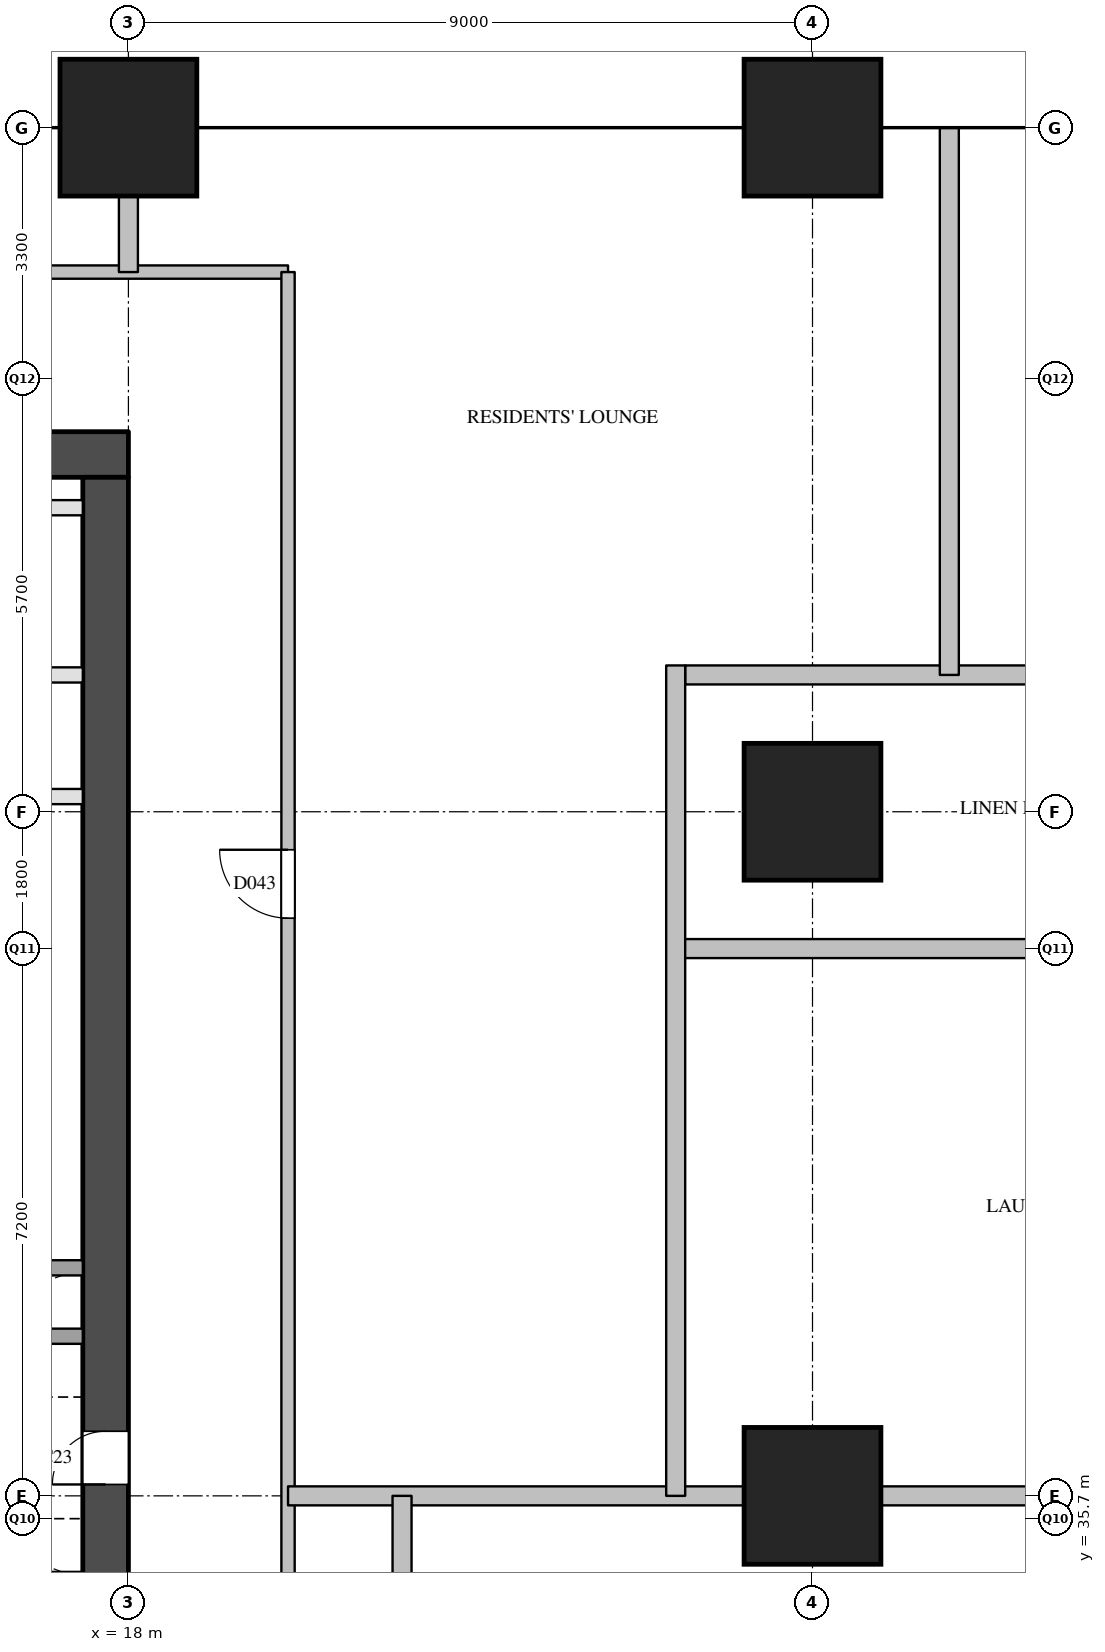
"""IFC4 building model, lengths in metres.
Left out: names, types, materials, properties, quantities, classifications, styles, units other than length and angle.
Written with IfcOpenShell. Run it as: python <this file> out.ifc"""

import sys

from ifc_helpers import new_model, si_unit, direction, frame, frame_2d, origin, origin_2d, place, context, subcontext, project, spatial, rectangle, extrude, element, fill, save


model = new_model("IFC4")
c1 = context("Model", 3, precision=1e-05, world=origin(), true_north=direction((0.0, 1.0)))
c2 = subcontext(c1, "Body", "Model", "MODEL_VIEW")
j1 = project(units=[si_unit("LENGTHUNIT", "METRE"), si_unit("PLANEANGLEUNIT", "RADIAN")], contexts=[c1])
p1 = place(None, origin())
s1 = spatial("IfcSite", under=j1, at=p1, CompositionType="ELEMENT")
p2 = place(p1, origin())
s2 = spatial("IfcBuilding", under=s1, at=p2, CompositionType="ELEMENT")
p3 = place(p2, frame((0.0, 0.0, 69.0)))
s3 = spatial("IfcBuildingStorey", under=s2, at=p3, CompositionType="ELEMENT", Elevation=69.0)
for number, where, z_axis, x_axis in (
    (1, (18.0, 54.0, 0.0), (0.0, 0.0, 1.0), (1.0, 0.0, 0.0)),
    (2, (27.0, 36.0, 0.0), (0.0, 0.0, 1.0), (1.0, 0.0, 0.0)),
    (3, (27.0, 45.0, 0.0), (0.0, 0.0, 1.0), (1.0, 0.0, 0.0)),
    (4, (27.0, 54.0, 0.0), (0.0, 0.0, 1.0), (1.0, 0.0, 0.0)),
):
    element("IfcColumn", number, at=place(p3, frame(where, z_axis=z_axis, x_axis=x_axis)), inside=s3, PredefinedType="COLUMN", context=c2, shape_type="SweptSolid", body=[
        extrude(rectangle(XDim=1.8, YDim=1.8, at=origin_2d()), origin(), (0.0, 0.0, 1.0), 3.8),
    ])
p4 = place(p3, frame((5.6, 49.7, 0.0), z_axis=(0.0, 0.0, 1.0), x_axis=(1.0, 0.0, 0.0)))
e5 = element("IfcWall", 5, at=p4, inside=s3, PredefinedType="SHEAR", context=c2, shape_type="SweptSolid", body=[
    extrude(rectangle(XDim=12.4, YDim=0.6, at=frame_2d((6.2, 0.0))), origin(), (0.0, 0.0, 1.0), 3.5),
])
p5 = place(p3, frame((17.7, 29.1, 0.0), z_axis=(0.0, 0.0, 1.0), x_axis=(0.0, 1.0, 0.0)))
e6 = element("IfcWall", 6, at=p5, inside=s3, PredefinedType="SHEAR", context=c2, shape_type="SweptSolid", body=[
    extrude(rectangle(XDim=20.3, YDim=0.6, at=frame_2d((10.15, 0.0))), origin(), (0.0, 0.0, 1.0), 3.5),
])
p6 = place(p5, frame((1.25, 0.0, 0.0)))
e7 = element("IfcOpeningElement", 7, at=p6, cuts=e6, PredefinedType="OPENING", context=c2, shape_type="SweptSolid", body=[
    extrude(rectangle(XDim=0.7, YDim=2.1, at=frame_2d((0.35, 1.05))), frame((0.0, 0.31, 0.0), z_axis=(0.0, -1.0, 0.0), x_axis=(1.0, 0.0, 0.0)), (0.0, 0.0, 1.0), 0.62),
])
p7 = place(p5, frame((7.05, 0.0, 0.0)))
e8 = element("IfcOpeningElement", 8, at=p7, cuts=e6, PredefinedType="OPENING", context=c2, shape_type="SweptSolid", body=[
    extrude(rectangle(XDim=0.7, YDim=2.1, at=frame_2d((0.35, 1.05))), frame((0.0, 0.31, 0.0), z_axis=(0.0, -1.0, 0.0), x_axis=(1.0, 0.0, 0.0)), (0.0, 0.0, 1.0), 0.62),
])
p8 = place(p3, frame((6.2, 38.1, 0.0), z_axis=(0.0, 0.0, 1.0), x_axis=(1.0, 0.0, 0.0)))
e9 = element("IfcWall", 9, at=p8, inside=s3, PredefinedType="SOLIDWALL", context=c2, shape_type="SweptSolid", body=[
    extrude(rectangle(XDim=11.2, YDim=0.2, at=frame_2d((5.6, 0.0))), origin(), (0.0, 0.0, 1.0), 3.5),
])
p9 = place(p8, frame((0.45, 0.0, 0.0)))
e10 = element("IfcOpeningElement", 10, at=p9, cuts=e9, PredefinedType="OPENING", context=c2, shape_type="SweptSolid", body=[
    extrude(rectangle(XDim=1.2, YDim=2.1, at=frame_2d((0.6, 1.05))), frame((0.0, 0.11, 0.0), z_axis=(0.0, -1.0, 0.0), x_axis=(1.0, 0.0, 0.0)), (0.0, 0.0, 1.0), 0.22),
])
p10 = place(p8, frame((2.55, 0.0, 0.0)))
e11 = element("IfcOpeningElement", 11, at=p10, cuts=e9, PredefinedType="OPENING", context=c2, shape_type="SweptSolid", body=[
    extrude(rectangle(XDim=1.2, YDim=2.1, at=frame_2d((0.6, 1.05))), frame((0.0, 0.11, 0.0), z_axis=(0.0, -1.0, 0.0), x_axis=(1.0, 0.0, 0.0)), (0.0, 0.0, 1.0), 0.22),
])
p11 = place(p8, frame((4.65, 0.0, 0.0)))
e12 = element("IfcOpeningElement", 12, at=p11, cuts=e9, PredefinedType="OPENING", context=c2, shape_type="SweptSolid", body=[
    extrude(rectangle(XDim=1.2, YDim=2.1, at=frame_2d((0.6, 1.05))), frame((0.0, 0.11, 0.0), z_axis=(0.0, -1.0, 0.0), x_axis=(1.0, 0.0, 0.0)), (0.0, 0.0, 1.0), 0.22),
])
p12 = place(p8, frame((6.75, 0.0, 0.0)))
e13 = element("IfcOpeningElement", 13, at=p12, cuts=e9, PredefinedType="OPENING", context=c2, shape_type="SweptSolid", body=[
    extrude(rectangle(XDim=1.2, YDim=2.1, at=frame_2d((0.6, 1.05))), frame((0.0, 0.11, 0.0), z_axis=(0.0, -1.0, 0.0), x_axis=(1.0, 0.0, 0.0)), (0.0, 0.0, 1.0), 0.22),
])
p13 = place(p3, frame((12.5, 39.0, 0.0), z_axis=(0.0, 0.0, 1.0), x_axis=(1.0, 0.0, 0.0)))
e14 = element("IfcWall", 14, at=p13, inside=s3, PredefinedType="SOLIDWALL", context=c2, shape_type="SweptSolid", body=[
    extrude(rectangle(XDim=4.9, YDim=0.2, at=frame_2d((2.45, 0.0))), origin(), (0.0, 0.0, 1.0), 3.5),
])
p14 = place(p3, frame((12.5, 45.2, 0.0), z_axis=(0.0, 0.0, 1.0), x_axis=(1.0, 0.0, 0.0)))
e15 = element("IfcWall", 15, at=p14, inside=s3, PredefinedType="PARTITIONING", context=c2, shape_type="SweptSolid", body=[
    extrude(rectangle(XDim=4.9, YDim=0.2, at=frame_2d((2.45, 0.0))), origin(), (0.0, 0.0, 1.0), 3.5),
])
p15 = place(p14, frame((0.53, 0.0, 0.0)))
e16 = element("IfcOpeningElement", 16, at=p15, cuts=e15, PredefinedType="OPENING", context=c2, shape_type="SweptSolid", body=[
    extrude(rectangle(XDim=0.9, YDim=2.1, at=frame_2d((0.45, 1.05))), frame((0.0, 0.11, 0.0), z_axis=(0.0, -1.0, 0.0), x_axis=(1.0, 0.0, 0.0)), (0.0, 0.0, 1.0), 0.22),
])
p16 = place(p14, frame((2.98, 0.0, 0.0)))
e17 = element("IfcOpeningElement", 17, at=p16, cuts=e15, PredefinedType="OPENING", context=c2, shape_type="SweptSolid", body=[
    extrude(rectangle(XDim=0.9, YDim=2.1, at=frame_2d((0.45, 1.05))), frame((0.0, 0.11, 0.0), z_axis=(0.0, -1.0, 0.0), x_axis=(1.0, 0.0, 0.0)), (0.0, 0.0, 1.0), 0.22),
])
p17 = place(p3, frame((6.2, 46.8, 0.0), z_axis=(0.0, 0.0, 1.0), x_axis=(1.0, 0.0, 0.0)))
e18 = element("IfcWall", 18, at=p17, inside=s3, PredefinedType="PARTITIONING", context=c2, shape_type="SweptSolid", body=[
    extrude(rectangle(XDim=11.2, YDim=0.2, at=frame_2d((5.6, 0.0))), origin(), (0.0, 0.0, 1.0), 3.5),
])
p18 = place(p17, frame((1.23, 0.0, 0.0)))
e19 = element("IfcOpeningElement", 19, at=p18, cuts=e18, PredefinedType="OPENING", context=c2, shape_type="SweptSolid", body=[
    extrude(rectangle(XDim=0.9, YDim=2.1, at=frame_2d((0.45, 1.05))), frame((0.0, 0.11, 0.0), z_axis=(0.0, -1.0, 0.0), x_axis=(1.0, 0.0, 0.0)), (0.0, 0.0, 1.0), 0.22),
])
p19 = place(p17, frame((6.83, 0.0, 0.0)))
e20 = element("IfcOpeningElement", 20, at=p19, cuts=e18, PredefinedType="OPENING", context=c2, shape_type="SweptSolid", body=[
    extrude(rectangle(XDim=0.9, YDim=2.1, at=frame_2d((0.45, 1.05))), frame((0.0, 0.11, 0.0), z_axis=(0.0, -1.0, 0.0), x_axis=(1.0, 0.0, 0.0)), (0.0, 0.0, 1.0), 0.22),
])
p20 = place(p3, frame((6.2, 49.0, 0.0), z_axis=(0.0, 0.0, 1.0), x_axis=(1.0, 0.0, 0.0)))
e21 = element("IfcWall", 21, at=p20, inside=s3, PredefinedType="PARTITIONING", context=c2, shape_type="SweptSolid", body=[
    extrude(rectangle(XDim=11.2, YDim=0.2, at=frame_2d((5.6, 0.0))), origin(), (0.0, 0.0, 1.0), 3.5),
])
p21 = place(p3, frame((3.5, 52.1, 0.0), z_axis=(0.0, 0.0, 1.0), x_axis=(1.0, 0.0, 0.0)))
e22 = element("IfcWall", 22, at=p21, inside=s3, PredefinedType="PARTITIONING", context=c2, shape_type="SweptSolid", body=[
    extrude(rectangle(XDim=16.6, YDim=0.175, at=frame_2d((8.3, 0.0))), origin(), (0.0, 0.0, 1.0), 3.5),
])
p22 = place(p21, frame((7.389, 0.0, 0.0)))
e23 = element("IfcOpeningElement", 23, at=p22, cuts=e22, PredefinedType="OPENING", context=c2, shape_type="SweptSolid", body=[
    extrude(rectangle(XDim=0.9, YDim=2.1, at=frame_2d((0.45, 1.05))), frame((0.0, 0.097, 0.0), z_axis=(0.0, -1.0, 0.0), x_axis=(1.0, 0.0, 0.0)), (0.0, 0.0, 1.0), 0.195),
])
p23 = place(p3, frame((20.1, 28.52, 0.0), z_axis=(0.0, 0.0, 1.0), x_axis=(0.0, 1.0, 0.0)))
e24 = element("IfcWall", 24, at=p23, inside=s3, PredefinedType="PARTITIONING", context=c2, shape_type="SweptSolid", body=[
    extrude(rectangle(XDim=23.58, YDim=0.175, at=frame_2d((11.79, 0.0))), origin(), (0.0, 0.0, 1.0), 3.5),
])
p24 = place(p23, frame((3.43, 0.0, 0.0)))
e25 = element("IfcOpeningElement", 25, at=p24, cuts=e24, PredefinedType="OPENING", context=c2, shape_type="SweptSolid", body=[
    extrude(rectangle(XDim=0.9, YDim=2.1, at=frame_2d((0.45, 1.05))), frame((0.0, 0.097, 0.0), z_axis=(0.0, -1.0, 0.0), x_axis=(1.0, 0.0, 0.0)), (0.0, 0.0, 1.0), 0.195),
])
p25 = place(p23, frame((15.08, 0.0, 0.0)))
e26 = element("IfcOpeningElement", 26, at=p25, cuts=e24, PredefinedType="OPENING", context=c2, shape_type="SweptSolid", body=[
    extrude(rectangle(XDim=0.9, YDim=2.1, at=frame_2d((0.45, 1.05))), frame((0.0, 0.097, 0.0), z_axis=(0.0, -1.0, 0.0), x_axis=(1.0, 0.0, 0.0)), (0.0, 0.0, 1.0), 0.195),
])
p26 = place(p3, frame((20.1, 36.0, 0.0), z_axis=(0.0, 0.0, 1.0), x_axis=(1.0, 0.0, 0.0)))
e27 = element("IfcWall", 27, at=p26, inside=s3, PredefinedType="PARTITIONING", context=c2, shape_type="SweptSolid", body=[
    extrude(rectangle(XDim=13.8, YDim=0.25, at=frame_2d((6.9, 0.0))), origin(), (0.0, 0.0, 1.0), 3.5),
])
p27 = place(p3, frame((25.2, 43.2, 0.0), z_axis=(0.0, 0.0, 1.0), x_axis=(1.0, 0.0, 0.0)))
e28 = element("IfcWall", 28, at=p27, inside=s3, PredefinedType="PARTITIONING", context=c2, shape_type="SweptSolid", body=[
    extrude(rectangle(XDim=8.7, YDim=0.25, at=frame_2d((4.35, 0.0))), origin(), (0.0, 0.0, 1.0), 2.5),
])
p28 = place(p3, frame((25.325, 46.8, 0.0), z_axis=(0.0, 0.0, 1.0), x_axis=(1.0, 0.0, 0.0)))
e29 = element("IfcWall", 29, at=p28, inside=s3, PredefinedType="PARTITIONING", context=c2, shape_type="SweptSolid", body=[
    extrude(rectangle(XDim=8.575, YDim=0.25, at=frame_2d((4.288, 0.0))), origin(), (0.0, 0.0, 1.0), 2.5),
])
p29 = place(p3, frame((18.0, 52.1, 0.0), z_axis=(0.0, 0.0, 1.0), x_axis=(0.0, 1.0, 0.0)))
e30 = element("IfcWall", 30, at=p29, inside=s3, PredefinedType="PARTITIONING", context=c2, shape_type="SweptSolid", body=[
    extrude(rectangle(XDim=1.9, YDim=0.25, at=frame_2d((0.95, 0.0))), origin(), (0.0, 0.0, 1.0), 3.5),
])
p30 = place(p3, frame((21.6, 28.8, 0.0), z_axis=(0.0, 0.0, 1.0), x_axis=(0.0, 1.0, 0.0)))
e31 = element("IfcWall", 31, at=p30, inside=s3, PredefinedType="PARTITIONING", context=c2, shape_type="SweptSolid", body=[
    extrude(rectangle(XDim=7.2, YDim=0.25, at=frame_2d((3.6, 0.0))), origin(), (0.0, 0.0, 1.0), 3.5),
])
p31 = place(p3, frame((25.2, 36.0, 0.0), z_axis=(0.0, 0.0, 1.0), x_axis=(0.0, 1.0, 0.0)))
e32 = element("IfcWall", 32, at=p31, inside=s3, PredefinedType="PARTITIONING", context=c2, shape_type="SweptSolid", body=[
    extrude(rectangle(XDim=10.925, YDim=0.25, at=frame_2d((5.462, 0.0))), origin(), (0.0, 0.0, 1.0), 3.5),
])
p32 = place(p3, frame((28.8, 46.8, 0.0), z_axis=(0.0, 0.0, 1.0), x_axis=(0.0, 1.0, 0.0)))
e33 = element("IfcWall", 33, at=p32, inside=s3, PredefinedType="PARTITIONING", context=c2, shape_type="SweptSolid", body=[
    extrude(rectangle(XDim=7.2, YDim=0.25, at=frame_2d((3.6, 0.0))), origin(), (0.0, 0.0, 1.0), 2.5),
])
p33 = place(p7, origin())
e34 = element("IfcDoor", 34, at=p33, inside=s3, OperationType="SINGLE_SWING_LEFT", PredefinedType="DOOR", context=c2, shape_type="SweptSolid", body=[
    extrude(rectangle(XDim=0.7, YDim=2.1, at=frame_2d((0.35, 1.05))), frame((0.0, 0.025, 0.0), z_axis=(0.0, -1.0, 0.0), x_axis=(1.0, 0.0, 0.0)), (0.0, 0.0, 1.0), 0.05),
])
fill(e8, e34)
p34 = place(p25, origin())
e35 = element("IfcDoor", 35, at=p34, inside=s3, OperationType="SINGLE_SWING_RIGHT", PredefinedType="DOOR", context=c2, shape_type="SweptSolid", body=[
    extrude(rectangle(XDim=0.9, YDim=2.1, at=frame_2d((0.45, 1.05))), frame((0.0, 0.025, 0.0), z_axis=(0.0, -1.0, 0.0), x_axis=(1.0, 0.0, 0.0)), (0.0, 0.0, 1.0), 0.05),
])
fill(e26, e35)
save(model, sys.argv[1])
